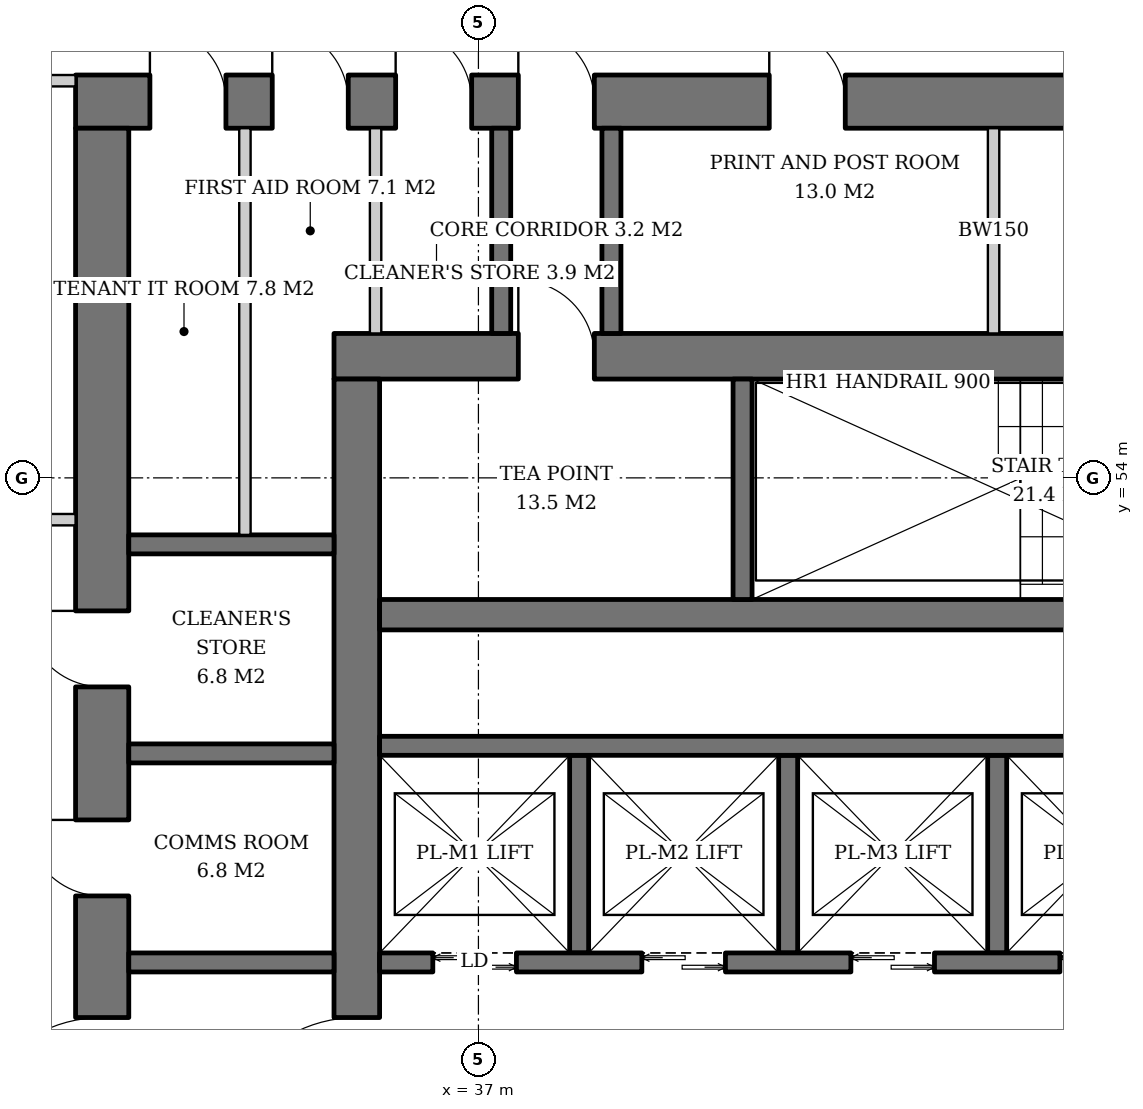
"""IFC4 building model, lengths in metres.
Left out: names, types, materials, properties, quantities, classifications, styles, units other than length and angle.
Written with IfcOpenShell. Run it as: python <this file> out.ifc"""

import sys

from ifc_helpers import new_model, si_unit, direction, frame, frame_2d, origin, place, context, subcontext, project, spatial, rectangle, extrude, element, fill, save


model = new_model("IFC4")
c1 = context("Model", 3, precision=1e-05, world=origin(), true_north=direction((0.0, 1.0)))
c2 = subcontext(c1, "Body", "Model", "MODEL_VIEW")
j1 = project(units=[si_unit("LENGTHUNIT", "METRE"), si_unit("PLANEANGLEUNIT", "RADIAN")], contexts=[c1])
p1 = place(None, origin())
s1 = spatial("IfcSite", under=j1, at=p1, CompositionType="ELEMENT")
p2 = place(p1, origin())
s2 = spatial("IfcBuilding", under=s1, at=p2, CompositionType="ELEMENT")
p3 = place(p2, frame((0.0, 0.0, 104.6)))
s3 = spatial("IfcBuildingStorey", under=s2, at=p3, CompositionType="ELEMENT", Elevation=104.6)
p4 = place(p3, frame((35.1, 55.6, 0.0), z_axis=(0.0, 0.0, 1.0), x_axis=(1.0, 0.0, 0.0)))
e1 = element("IfcWall", 1, at=p4, inside=s3, PredefinedType="SHEAR", context=c2, shape_type="SweptSolid", body=[
    extrude(rectangle(XDim=19.8, YDim=0.6, at=frame_2d((9.9, 0.0))), origin(), (0.0, 0.0, 1.0), 3.8),
])
p5 = place(p4, frame((14.54, 0.0, 0.0)))
e2 = element("IfcOpeningElement", 2, at=p5, cuts=e1, PredefinedType="OPENING", context=c2, shape_type="SweptSolid", body=[
    extrude(rectangle(XDim=1.0, YDim=2.1, at=frame_2d((0.5, 1.05))), frame((0.0, 0.31, 0.0), z_axis=(0.0, -1.0, 0.0), x_axis=(1.0, 0.0, 0.0)), (0.0, 0.0, 1.0), 0.62),
])
p6 = place(p4, frame((2.425, 0.0, 0.0)))
e3 = element("IfcOpeningElement", 3, at=p6, cuts=e1, PredefinedType="OPENING", context=c2, shape_type="SweptSolid", body=[
    extrude(rectangle(XDim=1.0, YDim=2.1, at=frame_2d((0.5, 1.05))), frame((0.0, 0.31, 0.0), z_axis=(0.0, -1.0, 0.0), x_axis=(1.0, 0.0, 0.0)), (0.0, 0.0, 1.0), 0.62),
])
p7 = place(p3, frame((35.4, 36.7, 0.0), z_axis=(0.0, 0.0, 1.0), x_axis=(0.0, 1.0, 0.0)))
e4 = element("IfcWall", 4, at=p7, inside=s3, PredefinedType="SHEAR", context=c2, shape_type="SweptSolid", body=[
    extrude(rectangle(XDim=18.6, YDim=0.6, at=frame_2d((9.3, 0.0))), origin(), (0.0, 0.0, 1.0), 3.8),
])
p8 = place(p7, frame((8.4, 0.0, 0.0)))
e5 = element("IfcOpeningElement", 5, at=p8, cuts=e4, PredefinedType="OPENING", context=c2, shape_type="SweptSolid", body=[
    extrude(rectangle(XDim=1.8, YDim=2.4, at=frame_2d((0.9, 1.2))), frame((0.0, 0.31, 0.0), z_axis=(0.0, -1.0, 0.0), x_axis=(1.0, 0.0, 0.0)), (0.0, 0.0, 1.0), 0.62),
])
p9 = place(p3, frame((31.7, 58.95, 0.0), z_axis=(0.0, 0.0, 1.0), x_axis=(1.0, 0.0, 0.0)))
e6 = element("IfcWall", 6, at=p9, inside=s3, PredefinedType="SHEAR", context=c2, shape_type="SweptSolid", body=[
    extrude(rectangle(XDim=26.6, YDim=0.7, at=frame_2d((13.3, 0.0))), origin(), (0.0, 0.0, 1.0), 3.8),
])
p10 = place(p9, frame((17.94, 0.0, 0.0)))
e7 = element("IfcOpeningElement", 7, at=p10, cuts=e6, PredefinedType="OPENING", context=c2, shape_type="SweptSolid", body=[
    extrude(rectangle(XDim=1.0, YDim=2.1, at=frame_2d((0.5, 1.05))), frame((0.0, 0.36, 0.0), z_axis=(0.0, -1.0, 0.0), x_axis=(1.0, 0.0, 0.0)), (0.0, 0.0, 1.0), 0.72),
])
p11 = place(p9, frame((5.825, 0.0, 0.0)))
e8 = element("IfcOpeningElement", 8, at=p11, cuts=e6, PredefinedType="OPENING", context=c2, shape_type="SweptSolid", body=[
    extrude(rectangle(XDim=1.0, YDim=2.1, at=frame_2d((0.5, 1.05))), frame((0.0, 0.36, 0.0), z_axis=(0.0, -1.0, 0.0), x_axis=(1.0, 0.0, 0.0)), (0.0, 0.0, 1.0), 0.72),
])
p12 = place(p9, frame((0.978, 0.0, 0.0)))
e9 = element("IfcOpeningElement", 9, at=p12, cuts=e6, PredefinedType="OPENING", context=c2, shape_type="SweptSolid", body=[
    extrude(rectangle(XDim=1.0, YDim=2.1, at=frame_2d((0.5, 1.05))), frame((0.0, 0.36, 0.0), z_axis=(0.0, -1.0, 0.0), x_axis=(1.0, 0.0, 0.0)), (0.0, 0.0, 1.0), 0.72),
])
p13 = place(p9, frame((2.587, 0.0, 0.0)))
e10 = element("IfcOpeningElement", 10, at=p13, cuts=e6, PredefinedType="OPENING", context=c2, shape_type="SweptSolid", body=[
    extrude(rectangle(XDim=1.0, YDim=2.1, at=frame_2d((0.5, 1.05))), frame((0.0, 0.36, 0.0), z_axis=(0.0, -1.0, 0.0), x_axis=(1.0, 0.0, 0.0)), (0.0, 0.0, 1.0), 0.72),
])
p14 = place(p9, frame((4.211, 0.0, 0.0)))
e11 = element("IfcOpeningElement", 11, at=p14, cuts=e6, PredefinedType="OPENING", context=c2, shape_type="SweptSolid", body=[
    extrude(rectangle(XDim=1.0, YDim=2.1, at=frame_2d((0.5, 1.05))), frame((0.0, 0.36, 0.0), z_axis=(0.0, -1.0, 0.0), x_axis=(1.0, 0.0, 0.0)), (0.0, 0.0, 1.0), 0.72),
])
p15 = place(p9, frame((9.126, 0.0, 0.0)))
e12 = element("IfcOpeningElement", 12, at=p15, cuts=e6, PredefinedType="OPENING", context=c2, shape_type="SweptSolid", body=[
    extrude(rectangle(XDim=1.0, YDim=2.1, at=frame_2d((0.5, 1.05))), frame((0.0, 0.36, 0.0), z_axis=(0.0, -1.0, 0.0), x_axis=(1.0, 0.0, 0.0)), (0.0, 0.0, 1.0), 0.72),
])
p16 = place(p9, frame((14.029, 0.0, 0.0)))
e13 = element("IfcOpeningElement", 13, at=p16, cuts=e6, PredefinedType="OPENING", context=c2, shape_type="SweptSolid", body=[
    extrude(rectangle(XDim=1.0, YDim=2.1, at=frame_2d((0.5, 1.05))), frame((0.0, 0.36, 0.0), z_axis=(0.0, -1.0, 0.0), x_axis=(1.0, 0.0, 0.0)), (0.0, 0.0, 1.0), 0.72),
])
p17 = place(p9, frame((22.4, 0.0, 0.0)))
e14 = element("IfcOpeningElement", 14, at=p17, cuts=e6, PredefinedType="OPENING", context=c2, shape_type="SweptSolid", body=[
    extrude(rectangle(XDim=1.0, YDim=2.1, at=frame_2d((0.5, 1.05))), frame((0.0, 0.36, 0.0), z_axis=(0.0, -1.0, 0.0), x_axis=(1.0, 0.0, 0.0)), (0.0, 0.0, 1.0), 0.72),
])
p18 = place(p3, frame((32.05, 33.4, 0.0), z_axis=(0.0, 0.0, 1.0), x_axis=(0.0, 1.0, 0.0)))
e15 = element("IfcWall", 15, at=p18, inside=s3, PredefinedType="SHEAR", context=c2, shape_type="SweptSolid", body=[
    extrude(rectangle(XDim=25.2, YDim=0.7, at=frame_2d((12.6, 0.0))), origin(), (0.0, 0.0, 1.0), 3.8),
])
p19 = place(p18, frame((11.7, 0.0, 0.0)))
e16 = element("IfcOpeningElement", 16, at=p19, cuts=e15, PredefinedType="OPENING", context=c2, shape_type="SweptSolid", body=[
    extrude(rectangle(XDim=1.8, YDim=2.4, at=frame_2d((0.9, 1.2))), frame((0.0, 0.36, 0.0), z_axis=(0.0, -1.0, 0.0), x_axis=(1.0, 0.0, 0.0)), (0.0, 0.0, 1.0), 0.72),
])
p20 = place(p18, frame((3.6, 0.0, 0.0)))
e17 = element("IfcOpeningElement", 17, at=p20, cuts=e15, PredefinedType="OPENING", context=c2, shape_type="SweptSolid", body=[
    extrude(rectangle(XDim=1.0, YDim=2.1, at=frame_2d((0.5, 1.05))), frame((0.0, 0.36, 0.0), z_axis=(0.0, -1.0, 0.0), x_axis=(1.0, 0.0, 0.0)), (0.0, 0.0, 1.0), 0.72),
])
p21 = place(p18, frame((6.35, 0.0, 0.0)))
e18 = element("IfcOpeningElement", 18, at=p21, cuts=e15, PredefinedType="OPENING", context=c2, shape_type="SweptSolid", body=[
    extrude(rectangle(XDim=1.0, YDim=2.1, at=frame_2d((0.5, 1.05))), frame((0.0, 0.36, 0.0), z_axis=(0.0, -1.0, 0.0), x_axis=(1.0, 0.0, 0.0)), (0.0, 0.0, 1.0), 0.72),
])
p22 = place(p18, frame((9.1, 0.0, 0.0)))
e19 = element("IfcOpeningElement", 19, at=p22, cuts=e15, PredefinedType="OPENING", context=c2, shape_type="SweptSolid", body=[
    extrude(rectangle(XDim=1.0, YDim=2.1, at=frame_2d((0.5, 1.05))), frame((0.0, 0.36, 0.0), z_axis=(0.0, -1.0, 0.0), x_axis=(1.0, 0.0, 0.0)), (0.0, 0.0, 1.0), 0.72),
])
p23 = place(p18, frame((15.1, 0.0, 0.0)))
e20 = element("IfcOpeningElement", 20, at=p23, cuts=e15, PredefinedType="OPENING", context=c2, shape_type="SweptSolid", body=[
    extrude(rectangle(XDim=1.0, YDim=2.1, at=frame_2d((0.5, 1.05))), frame((0.0, 0.36, 0.0), z_axis=(0.0, -1.0, 0.0), x_axis=(1.0, 0.0, 0.0)), (0.0, 0.0, 1.0), 0.72),
])
p24 = place(p18, frame((17.85, 0.0, 0.0)))
e21 = element("IfcOpeningElement", 21, at=p24, cuts=e15, PredefinedType="OPENING", context=c2, shape_type="SweptSolid", body=[
    extrude(rectangle(XDim=1.0, YDim=2.1, at=frame_2d((0.5, 1.05))), frame((0.0, 0.36, 0.0), z_axis=(0.0, -1.0, 0.0), x_axis=(1.0, 0.0, 0.0)), (0.0, 0.0, 1.0), 0.72),
])
p25 = place(p3, frame((35.7, 52.2, 0.0), z_axis=(0.0, 0.0, 1.0), x_axis=(1.0, 0.0, 0.0)))
e22 = element("IfcWall", 22, at=p25, inside=s3, PredefinedType="SHEAR", context=c2, shape_type="SweptSolid", body=[
    extrude(rectangle(XDim=18.6, YDim=0.4, at=frame_2d((9.3, 0.0))), origin(), (0.0, 0.0, 1.0), 3.8),
])
p26 = place(p3, frame((40.475, 52.4, 0.0), z_axis=(0.0, 0.0, 1.0), x_axis=(0.0, 1.0, 0.0)))
e23 = element("IfcWall", 23, at=p26, inside=s3, PredefinedType="SHEAR", context=c2, shape_type="SweptSolid", body=[
    extrude(rectangle(XDim=2.9, YDim=0.25, at=frame_2d((1.45, 0.0))), origin(), (0.0, 0.0, 1.0), 3.8),
])
for number, where, z_axis, x_axis in (
    (24, (38.325, 47.75, 0.0), (0.0, 0.0, 1.0), (0.0, 1.0, 0.0)),
    (25, (41.075, 47.75, 0.0), (0.0, 0.0, 1.0), (0.0, 1.0, 0.0)),
    (26, (43.825, 47.75, 0.0), (0.0, 0.0, 1.0), (0.0, 1.0, 0.0)),
):
    element("IfcWall", number, at=place(p3, frame(where, z_axis=z_axis, x_axis=x_axis)), inside=s3, PredefinedType="SHEAR", context=c2, shape_type="SweptSolid", body=[
        extrude(rectangle(XDim=2.6, YDim=0.25, at=frame_2d((1.3, 0.0))), origin(), (0.0, 0.0, 1.0), 3.8),
    ])
p27 = place(p3, frame((35.7, 50.475, 0.0), z_axis=(0.0, 0.0, 1.0), x_axis=(1.0, 0.0, 0.0)))
e27 = element("IfcWall", 27, at=p27, inside=s3, PredefinedType="SHEAR", context=c2, shape_type="SweptSolid", body=[
    extrude(rectangle(XDim=11.0, YDim=0.25, at=frame_2d((5.5, 0.0))), origin(), (0.0, 0.0, 1.0), 3.8),
])
p28 = place(p3, frame((35.7, 47.625, 0.0), z_axis=(0.0, 0.0, 1.0), x_axis=(1.0, 0.0, 0.0)))
e28 = element("IfcWall", 28, at=p28, inside=s3, PredefinedType="SHEAR", context=c2, shape_type="SweptSolid", body=[
    extrude(rectangle(XDim=12.83, YDim=0.25, at=frame_2d((6.415, 0.0))), origin(), (0.0, 0.0, 1.0), 3.8),
])
p29 = place(p28, frame((0.7, 0.0, 0.0)))
e29 = element("IfcOpeningElement", 29, at=p29, cuts=e28, PredefinedType="OPENING", context=c2, shape_type="SweptSolid", body=[
    extrude(rectangle(XDim=1.1, YDim=2.2, at=frame_2d((0.55, 1.1))), frame((0.0, 0.135, 0.0), z_axis=(0.0, -1.0, 0.0), x_axis=(1.0, 0.0, 0.0)), (0.0, 0.0, 1.0), 0.27),
])
p30 = place(p28, frame((3.45, 0.0, 0.0)))
e30 = element("IfcOpeningElement", 30, at=p30, cuts=e28, PredefinedType="OPENING", context=c2, shape_type="SweptSolid", body=[
    extrude(rectangle(XDim=1.1, YDim=2.2, at=frame_2d((0.55, 1.1))), frame((0.0, 0.135, 0.0), z_axis=(0.0, -1.0, 0.0), x_axis=(1.0, 0.0, 0.0)), (0.0, 0.0, 1.0), 0.27),
])
p31 = place(p28, frame((6.2, 0.0, 0.0)))
e31 = element("IfcOpeningElement", 31, at=p31, cuts=e28, PredefinedType="OPENING", context=c2, shape_type="SweptSolid", body=[
    extrude(rectangle(XDim=1.1, YDim=2.2, at=frame_2d((0.55, 1.1))), frame((0.0, 0.135, 0.0), z_axis=(0.0, -1.0, 0.0), x_axis=(1.0, 0.0, 0.0)), (0.0, 0.0, 1.0), 0.27),
])
p32 = place(p28, frame((8.95, 0.0, 0.0)))
e32 = element("IfcOpeningElement", 32, at=p32, cuts=e28, PredefinedType="OPENING", context=c2, shape_type="SweptSolid", body=[
    extrude(rectangle(XDim=1.1, YDim=2.2, at=frame_2d((0.55, 1.1))), frame((0.0, 0.135, 0.0), z_axis=(0.0, -1.0, 0.0), x_axis=(1.0, 0.0, 0.0)), (0.0, 0.0, 1.0), 0.27),
])
p33 = place(p28, frame((11.515, 0.0, 0.0)))
e33 = element("IfcOpeningElement", 33, at=p33, cuts=e28, PredefinedType="OPENING", context=c2, shape_type="SweptSolid", body=[
    extrude(rectangle(XDim=0.8, YDim=2.0, at=frame_2d((0.4, 1.0))), frame((0.0, 0.135, 0.0), z_axis=(0.0, -1.0, 0.0), x_axis=(1.0, 0.0, 0.0)), (0.0, 0.0, 1.0), 0.27),
])
for number, where, z_axis, x_axis in (
    (34, (32.4, 47.625, 0.0), (0.0, 0.0, 1.0), (1.0, 0.0, 0.0)),
    (35, (32.4, 50.375, 0.0), (0.0, 0.0, 1.0), (1.0, 0.0, 0.0)),
    (36, (32.4, 53.125, 0.0), (0.0, 0.0, 1.0), (1.0, 0.0, 0.0)),
):
    element("IfcWall", number, at=place(p3, frame(where, z_axis=z_axis, x_axis=x_axis)), inside=s3, PredefinedType="SHEAR", context=c2, shape_type="SweptSolid", body=[
        extrude(rectangle(XDim=2.7, YDim=0.25, at=frame_2d((1.35, 0.0))), origin(), (0.0, 0.0, 1.0), 3.8),
    ])
for number, where, z_axis, x_axis in (
    (37, (37.3, 55.9, 0.0), (0.0, 0.0, 1.0), (0.0, 1.0, 0.0)),
    (38, (38.75, 55.9, 0.0), (0.0, 0.0, 1.0), (0.0, 1.0, 0.0)),
):
    element("IfcWall", number, at=place(p3, frame(where, z_axis=z_axis, x_axis=x_axis)), inside=s3, PredefinedType="SOLIDWALL", context=c2, shape_type="SweptSolid", body=[
        extrude(rectangle(XDim=2.7, YDim=0.25, at=frame_2d((1.35, 0.0))), origin(), (0.0, 0.0, 1.0), 3.62),
    ])
p34 = place(p3, frame((33.928, 53.25, 0.0), z_axis=(0.0, 0.0, 1.0), x_axis=(0.0, 1.0, 0.0)))
e39 = element("IfcWall", 39, at=p34, inside=s3, PredefinedType="SOLIDWALL", context=c2, shape_type="SweptSolid", body=[
    extrude(rectangle(XDim=5.35, YDim=0.15, at=frame_2d((2.675, 0.0))), origin(), (0.0, 0.0, 1.0), 3.62),
])
for number, where, z_axis, x_axis in (
    (40, (35.647, 55.9, 0.0), (0.0, 0.0, 1.0), (0.0, 1.0, 0.0)),
    (41, (43.778, 55.9, 0.0), (0.0, 0.0, 1.0), (0.0, 1.0, 0.0)),
):
    element("IfcWall", number, at=place(p3, frame(where, z_axis=z_axis, x_axis=x_axis)), inside=s3, PredefinedType="SOLIDWALL", context=c2, shape_type="SweptSolid", body=[
        extrude(rectangle(XDim=2.7, YDim=0.15, at=frame_2d((1.35, 0.0))), origin(), (0.0, 0.0, 1.0), 3.62),
    ])
for number, where, z_axis, x_axis in (
    (42, (31.7, 59.225, 0.0), (0.0, 0.0, 1.0), (-1.0, 0.0, 0.0)),
    (43, (31.7, 53.45, 0.0), (0.0, 0.0, 1.0), (-1.0, 0.0, 0.0)),
):
    element("IfcWall", number, at=place(p3, frame(where, z_axis=z_axis, x_axis=x_axis)), inside=s3, PredefinedType="PARTITIONING", context=c2, shape_type="SweptSolid", body=[
        extrude(rectangle(XDim=2.325, YDim=0.15, at=frame_2d((1.163, 0.0))), origin(), (0.0, 0.0, 1.0), 3.62),
    ])
p35 = place(p29, origin())
e44 = element("IfcDoor", 44, at=p35, inside=s3, OperationType="DOUBLE_DOOR_SLIDING", PredefinedType="DOOR", context=c2, shape_type="SweptSolid", body=[
    extrude(rectangle(XDim=1.1, YDim=2.2, at=frame_2d((0.55, 1.1))), frame((0.0, 0.025, 0.0), z_axis=(0.0, -1.0, 0.0), x_axis=(1.0, 0.0, 0.0)), (0.0, 0.0, 1.0), 0.05),
])
fill(e29, e44)
p36 = place(p30, origin())
e45 = element("IfcDoor", 45, at=p36, inside=s3, OperationType="DOUBLE_DOOR_SLIDING", PredefinedType="DOOR", context=c2, shape_type="SweptSolid", body=[
    extrude(rectangle(XDim=1.1, YDim=2.2, at=frame_2d((0.55, 1.1))), frame((0.0, 0.025, 0.0), z_axis=(0.0, -1.0, 0.0), x_axis=(1.0, 0.0, 0.0)), (0.0, 0.0, 1.0), 0.05),
])
fill(e30, e45)
p37 = place(p31, origin())
e46 = element("IfcDoor", 46, at=p37, inside=s3, OperationType="DOUBLE_DOOR_SLIDING", PredefinedType="DOOR", context=c2, shape_type="SweptSolid", body=[
    extrude(rectangle(XDim=1.1, YDim=2.2, at=frame_2d((0.55, 1.1))), frame((0.0, 0.025, 0.0), z_axis=(0.0, -1.0, 0.0), x_axis=(1.0, 0.0, 0.0)), (0.0, 0.0, 1.0), 0.05),
])
fill(e31, e46)
p38 = place(p32, origin())
e47 = element("IfcDoor", 47, at=p38, inside=s3, OperationType="DOUBLE_DOOR_SLIDING", PredefinedType="DOOR", context=c2, shape_type="SweptSolid", body=[
    extrude(rectangle(XDim=1.1, YDim=2.2, at=frame_2d((0.55, 1.1))), frame((0.0, 0.025, 0.0), z_axis=(0.0, -1.0, 0.0), x_axis=(1.0, 0.0, 0.0)), (0.0, 0.0, 1.0), 0.05),
])
fill(e32, e47)
p39 = place(p8, origin())
e48 = element("IfcDoor", 48, at=p39, inside=s3, OperationType="DOUBLE_DOOR_SINGLE_SWING", PredefinedType="DOOR", context=c2, shape_type="SweptSolid", body=[
    extrude(rectangle(XDim=1.8, YDim=2.4, at=frame_2d((0.9, 1.2))), frame((0.0, 0.025, 0.0), z_axis=(0.0, -1.0, 0.0), x_axis=(1.0, 0.0, 0.0)), (0.0, 0.0, 1.0), 0.05),
])
fill(e5, e48)
p40 = place(p19, origin())
e49 = element("IfcDoor", 49, at=p40, inside=s3, OperationType="DOUBLE_DOOR_SINGLE_SWING", PredefinedType="DOOR", context=c2, shape_type="SweptSolid", body=[
    extrude(rectangle(XDim=1.8, YDim=2.4, at=frame_2d((0.9, 1.2))), frame((0.0, 0.025, 0.0), z_axis=(0.0, -1.0, 0.0), x_axis=(1.0, 0.0, 0.0)), (0.0, 0.0, 1.0), 0.05),
])
fill(e16, e49)
p41 = place(p11, origin())
e50 = element("IfcDoor", 50, at=p41, inside=s3, OperationType="SINGLE_SWING_LEFT", PredefinedType="DOOR", context=c2, shape_type="SweptSolid", body=[
    extrude(rectangle(XDim=1.0, YDim=2.1, at=frame_2d((0.5, 1.05))), frame((0.0, 0.025, 0.0), z_axis=(0.0, -1.0, 0.0), x_axis=(1.0, 0.0, 0.0)), (0.0, 0.0, 1.0), 0.05),
])
fill(e8, e50)
p42 = place(p6, origin())
e51 = element("IfcDoor", 51, at=p42, inside=s3, OperationType="SINGLE_SWING_LEFT", PredefinedType="DOOR", context=c2, shape_type="SweptSolid", body=[
    extrude(rectangle(XDim=1.0, YDim=2.1, at=frame_2d((0.5, 1.05))), frame((0.0, -0.24, 0.0), z_axis=(0.0, -1.0, 0.0), x_axis=(1.0, 0.0, 0.0)), (0.0, 0.0, 1.0), 0.05),
])
fill(e3, e51)
p43 = place(p23, origin())
e52 = element("IfcDoor", 52, at=p43, inside=s3, OperationType="SINGLE_SWING_RIGHT", PredefinedType="DOOR", context=c2, shape_type="SweptSolid", body=[
    extrude(rectangle(XDim=1.0, YDim=2.1, at=frame_2d((0.5, 1.05))), frame((0.0, -0.29, 0.0), z_axis=(0.0, -1.0, 0.0), x_axis=(1.0, 0.0, 0.0)), (0.0, 0.0, 1.0), 0.05),
])
fill(e20, e52)
p44 = place(p24, origin())
e53 = element("IfcDoor", 53, at=p44, inside=s3, OperationType="SINGLE_SWING_RIGHT", PredefinedType="DOOR", context=c2, shape_type="SweptSolid", body=[
    extrude(rectangle(XDim=1.0, YDim=2.1, at=frame_2d((0.5, 1.05))), frame((0.0, -0.29, 0.0), z_axis=(0.0, -1.0, 0.0), x_axis=(1.0, 0.0, 0.0)), (0.0, 0.0, 1.0), 0.05),
])
fill(e21, e53)
p45 = place(p12, origin())
e54 = element("IfcDoor", 54, at=p45, inside=s3, OperationType="SINGLE_SWING_LEFT", PredefinedType="DOOR", context=c2, shape_type="SweptSolid", body=[
    extrude(rectangle(XDim=1.0, YDim=2.1, at=frame_2d((0.5, 1.05))), frame((0.0, -0.29, 0.0), z_axis=(0.0, -1.0, 0.0), x_axis=(1.0, 0.0, 0.0)), (0.0, 0.0, 1.0), 0.05),
])
fill(e9, e54)
p46 = place(p13, origin())
e55 = element("IfcDoor", 55, at=p46, inside=s3, OperationType="SINGLE_SWING_LEFT", PredefinedType="DOOR", context=c2, shape_type="SweptSolid", body=[
    extrude(rectangle(XDim=1.0, YDim=2.1, at=frame_2d((0.5, 1.05))), frame((0.0, -0.29, 0.0), z_axis=(0.0, -1.0, 0.0), x_axis=(1.0, 0.0, 0.0)), (0.0, 0.0, 1.0), 0.05),
])
fill(e10, e55)
p47 = place(p14, origin())
e56 = element("IfcDoor", 56, at=p47, inside=s3, OperationType="SINGLE_SWING_LEFT", PredefinedType="DOOR", context=c2, shape_type="SweptSolid", body=[
    extrude(rectangle(XDim=1.0, YDim=2.1, at=frame_2d((0.5, 1.05))), frame((0.0, -0.29, 0.0), z_axis=(0.0, -1.0, 0.0), x_axis=(1.0, 0.0, 0.0)), (0.0, 0.0, 1.0), 0.05),
])
fill(e11, e56)
p48 = place(p15, origin())
e57 = element("IfcDoor", 57, at=p48, inside=s3, OperationType="SINGLE_SWING_LEFT", PredefinedType="DOOR", context=c2, shape_type="SweptSolid", body=[
    extrude(rectangle(XDim=1.0, YDim=2.1, at=frame_2d((0.5, 1.05))), frame((0.0, -0.29, 0.0), z_axis=(0.0, -1.0, 0.0), x_axis=(1.0, 0.0, 0.0)), (0.0, 0.0, 1.0), 0.05),
])
fill(e12, e57)
save(model, sys.argv[1])
